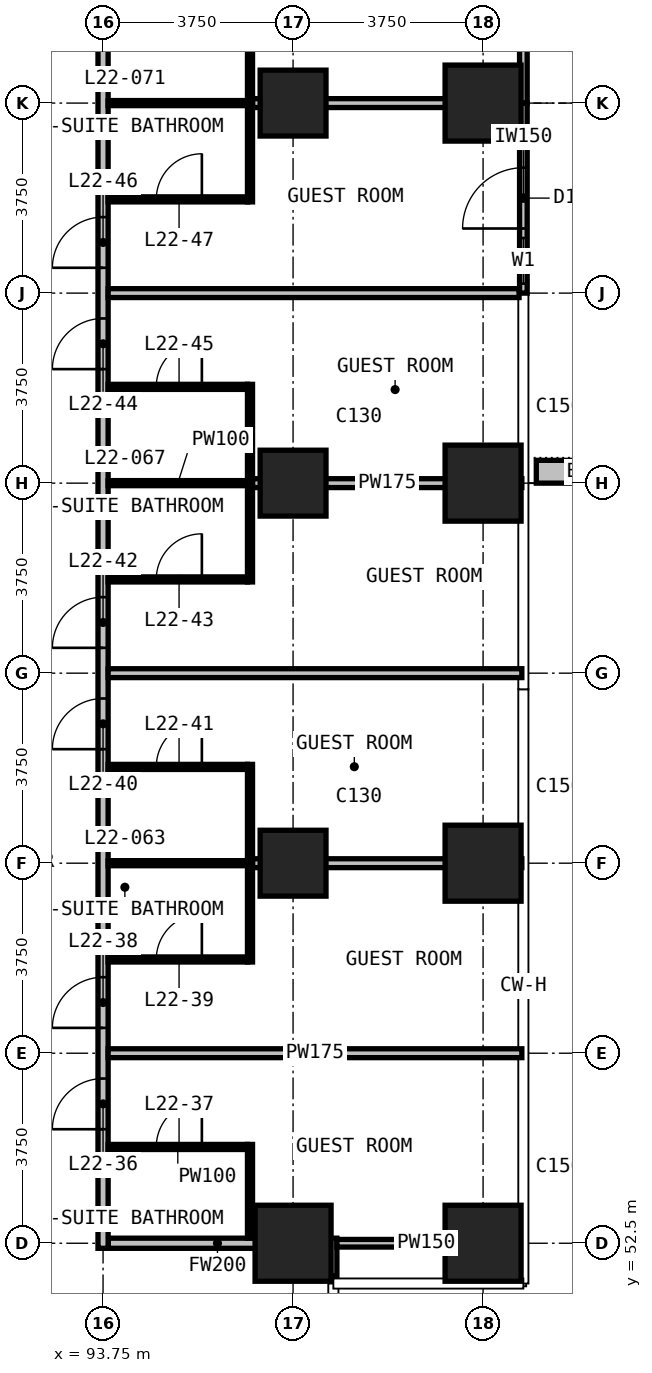
"""IFC4 building model, lengths in metres.
Left out: names, types, materials, properties, quantities, classifications, styles, units other than length and angle.
Written with IfcOpenShell. Run it as: python <this file> out.ifc"""

import sys

from ifc_helpers import new_model, si_unit, direction, frame, frame_2d, origin, origin_2d, place, context, subcontext, project, spatial, rectangle, extrude, element, fill, save


model = new_model("IFC4")
c1 = context("Model", 3, precision=1e-05, world=origin(), true_north=direction((0.0, 1.0)))
c2 = subcontext(c1, "Body", "Model", "MODEL_VIEW")
j1 = project(units=[si_unit("LENGTHUNIT", "METRE"), si_unit("PLANEANGLEUNIT", "RADIAN")], contexts=[c1])
p1 = place(None, origin())
s1 = spatial("IfcSite", under=j1, at=p1, CompositionType="ELEMENT")
p2 = place(p1, origin())
s2 = spatial("IfcBuilding", under=s1, at=p2, CompositionType="ELEMENT")
p3 = place(p2, frame((0.0, 0.0, 92.3)))
s3 = spatial("IfcBuildingStorey", under=s2, at=p3, CompositionType="ELEMENT", Elevation=92.3)
p4 = place(p3, frame((97.5, 52.5, 0.0), z_axis=(0.0, 0.0, 1.0), x_axis=(1.0, 0.0, 0.0)))
e1 = element("IfcColumn", 1, at=p4, inside=s3, PredefinedType="COLUMN", context=c2, shape_type="SweptSolid", body=[
    extrude(rectangle(XDim=1.5, YDim=1.5, at=origin_2d()), origin(), (0.0, 0.0, 1.0), 3.3),
])
for number, where, z_axis, x_axis in (
    (2, (97.5, 60.0, 0.0), (0.0, 0.0, 1.0), (1.0, 0.0, 0.0)),
    (3, (97.5, 67.5, 0.0), (0.0, 0.0, 1.0), (1.0, 0.0, 0.0)),
    (4, (97.5, 75.0, 0.0), (0.0, 0.0, 1.0), (1.0, 0.0, 0.0)),
):
    element("IfcColumn", number, at=place(p3, frame(where, z_axis=z_axis, x_axis=x_axis)), inside=s3, PredefinedType="COLUMN", context=c2, shape_type="SweptSolid", body=[
        extrude(rectangle(XDim=1.3, YDim=1.3, at=origin_2d()), origin(), (0.0, 0.0, 1.0), 3.3),
    ])
for number, where, z_axis, x_axis in (
    (5, (101.25, 52.5, 0.0), (0.0, 0.0, 1.0), (1.0, 0.0, 0.0)),
    (6, (101.25, 60.0, 0.0), (0.0, 0.0, 1.0), (1.0, 0.0, 0.0)),
    (7, (101.25, 67.5, 0.0), (0.0, 0.0, 1.0), (1.0, 0.0, 0.0)),
    (8, (101.25, 75.0, 0.0), (0.0, 0.0, 1.0), (1.0, 0.0, 0.0)),
):
    element("IfcColumn", number, at=place(p3, frame(where, z_axis=z_axis, x_axis=x_axis)), inside=s3, PredefinedType="COLUMN", context=c2, shape_type="SweptSolid", body=[
        extrude(rectangle(XDim=1.5, YDim=1.5, at=origin_2d()), origin(), (0.0, 0.0, 1.0), 3.3),
    ])
p5 = place(p3, frame((102.045, 71.25, 0.0), z_axis=(0.0, 0.0, 1.0), x_axis=(0.0, 1.0, 0.0)))
e9 = element("IfcWall", 9, at=p5, inside=s3, PredefinedType="SOLIDWALL", context=c2, shape_type="SweptSolid", body=[
    extrude(rectangle(XDim=3.75, YDim=0.15, at=frame_2d((1.875, 0.0))), origin(), (0.0, 0.0, 1.0), 3.0),
])
p6 = place(p5, frame((0.188, 0.0, 0.1)))
e10 = element("IfcOpeningElement", 10, at=p6, cuts=e9, PredefinedType="OPENING", context=c2, shape_type="SweptSolid", body=[
    extrude(rectangle(XDim=0.9, YDim=2.4, at=frame_2d((0.45, 1.2))), frame((0.0, 0.085, 0.0), z_axis=(0.0, -1.0, 0.0), x_axis=(1.0, 0.0, 0.0)), (0.0, 0.0, 1.0), 0.17),
])
p7 = place(p5, frame((1.275, 0.0, 0.0)))
e11 = element("IfcOpeningElement", 11, at=p7, cuts=e9, PredefinedType="OPENING", context=c2, shape_type="SweptSolid", body=[
    extrude(rectangle(XDim=1.2, YDim=2.4, at=frame_2d((0.6, 1.2))), frame((0.0, 0.085, 0.0), z_axis=(0.0, -1.0, 0.0), x_axis=(1.0, 0.0, 0.0)), (0.0, 0.0, 1.0), 0.17),
])
p8 = place(p3, frame((102.045, 75.0, 0.0), z_axis=(0.0, 0.0, 1.0), x_axis=(0.0, 1.0, 0.0)))
e12 = element("IfcWall", 12, at=p8, inside=s3, PredefinedType="SOLIDWALL", context=c2, shape_type="SweptSolid", body=[
    extrude(rectangle(XDim=3.75, YDim=0.15, at=frame_2d((1.875, 0.0))), origin(), (0.0, 0.0, 1.0), 3.0),
])
p9 = place(p8, frame((1.275, 0.0, 0.0)))
e13 = element("IfcOpeningElement", 13, at=p9, cuts=e12, PredefinedType="OPENING", context=c2, shape_type="SweptSolid", body=[
    extrude(rectangle(XDim=1.2, YDim=2.4, at=frame_2d((0.6, 1.2))), frame((0.0, 0.085, 0.0), z_axis=(0.0, -1.0, 0.0), x_axis=(1.0, 0.0, 0.0)), (0.0, 0.0, 1.0), 0.17),
])
p10 = place(p8, frame((2.663, 0.0, 0.1)))
e14 = element("IfcOpeningElement", 14, at=p10, cuts=e12, PredefinedType="OPENING", context=c2, shape_type="SweptSolid", body=[
    extrude(rectangle(XDim=0.9, YDim=2.4, at=frame_2d((0.45, 1.2))), frame((0.0, 0.085, 0.0), z_axis=(0.0, -1.0, 0.0), x_axis=(1.0, 0.0, 0.0)), (0.0, 0.0, 1.0), 0.17),
])
p11 = place(p3, frame((102.3, 67.725, 0.0), z_axis=(0.0, 0.0, 1.0), x_axis=(1.0, 0.0, 0.0)))
e15 = element("IfcWall", 15, at=p11, inside=s3, PredefinedType="USERDEFINED", context=c2, shape_type="SweptSolid", body=[
    extrude(rectangle(XDim=2.35, YDim=0.45, at=frame_2d((1.175, 0.0))), origin(), (0.0, 0.0, 1.0), 1.1),
])
p12 = place(p3, frame((93.85, 52.5, 0.0), z_axis=(0.0, 0.0, 1.0), x_axis=(1.0, 0.0, 0.0)))
e16 = element("IfcWall", 16, at=p12, inside=s3, PredefinedType="PARTITIONING", context=c2, shape_type="SweptSolid", body=[
    extrude(rectangle(XDim=4.315, YDim=0.2, at=frame_2d((2.157, 0.0))), origin(), (0.0, 0.0, 1.0), 3.0),
])
p13 = place(p3, frame((93.75, 52.4, 0.0), z_axis=(0.0, 0.0, 1.0), x_axis=(0.0, 1.0, 0.0)))
e17 = element("IfcWall", 17, at=p13, inside=s3, PredefinedType="PARTITIONING", context=c2, shape_type="SweptSolid", body=[
    extrude(rectangle(XDim=33.925, YDim=0.2, at=frame_2d((16.962, 0.0))), origin(), (0.0, 0.0, 1.0), 3.0),
])
p14 = place(p13, frame((2.35, 0.0, 0.0)))
e18 = element("IfcOpeningElement", 18, at=p14, cuts=e17, PredefinedType="OPENING", context=c2, shape_type="SweptSolid", body=[
    extrude(rectangle(XDim=1.0, YDim=2.2, at=frame_2d((0.5, 1.1))), frame((0.0, 0.11, 0.0), z_axis=(0.0, -1.0, 0.0), x_axis=(1.0, 0.0, 0.0)), (0.0, 0.0, 1.0), 0.22),
])
p15 = place(p13, frame((4.35, 0.0, 0.0)))
e19 = element("IfcOpeningElement", 19, at=p15, cuts=e17, PredefinedType="OPENING", context=c2, shape_type="SweptSolid", body=[
    extrude(rectangle(XDim=1.0, YDim=2.2, at=frame_2d((0.5, 1.1))), frame((0.0, 0.11, 0.0), z_axis=(0.0, -1.0, 0.0), x_axis=(1.0, 0.0, 0.0)), (0.0, 0.0, 1.0), 0.22),
])
p16 = place(p13, frame((9.85, 0.0, 0.0)))
e20 = element("IfcOpeningElement", 20, at=p16, cuts=e17, PredefinedType="OPENING", context=c2, shape_type="SweptSolid", body=[
    extrude(rectangle(XDim=1.0, YDim=2.2, at=frame_2d((0.5, 1.1))), frame((0.0, 0.11, 0.0), z_axis=(0.0, -1.0, 0.0), x_axis=(1.0, 0.0, 0.0)), (0.0, 0.0, 1.0), 0.22),
])
p17 = place(p13, frame((11.85, 0.0, 0.0)))
e21 = element("IfcOpeningElement", 21, at=p17, cuts=e17, PredefinedType="OPENING", context=c2, shape_type="SweptSolid", body=[
    extrude(rectangle(XDim=1.0, YDim=2.2, at=frame_2d((0.5, 1.1))), frame((0.0, 0.11, 0.0), z_axis=(0.0, -1.0, 0.0), x_axis=(1.0, 0.0, 0.0)), (0.0, 0.0, 1.0), 0.22),
])
p18 = place(p13, frame((17.35, 0.0, 0.0)))
e22 = element("IfcOpeningElement", 22, at=p18, cuts=e17, PredefinedType="OPENING", context=c2, shape_type="SweptSolid", body=[
    extrude(rectangle(XDim=1.0, YDim=2.2, at=frame_2d((0.5, 1.1))), frame((0.0, 0.11, 0.0), z_axis=(0.0, -1.0, 0.0), x_axis=(1.0, 0.0, 0.0)), (0.0, 0.0, 1.0), 0.22),
])
p19 = place(p13, frame((19.35, 0.0, 0.0)))
e23 = element("IfcOpeningElement", 23, at=p19, cuts=e17, PredefinedType="OPENING", context=c2, shape_type="SweptSolid", body=[
    extrude(rectangle(XDim=1.0, YDim=2.2, at=frame_2d((0.5, 1.1))), frame((0.0, 0.11, 0.0), z_axis=(0.0, -1.0, 0.0), x_axis=(1.0, 0.0, 0.0)), (0.0, 0.0, 1.0), 0.22),
])
p20 = place(p13, frame((24.85, 0.0, 0.0)))
e24 = element("IfcOpeningElement", 24, at=p20, cuts=e17, PredefinedType="OPENING", context=c2, shape_type="SweptSolid", body=[
    extrude(rectangle(XDim=1.0, YDim=2.2, at=frame_2d((0.5, 1.1))), frame((0.0, 0.11, 0.0), z_axis=(0.0, -1.0, 0.0), x_axis=(1.0, 0.0, 0.0)), (0.0, 0.0, 1.0), 0.22),
])
p21 = place(p13, frame((26.85, 0.0, 0.0)))
e25 = element("IfcOpeningElement", 25, at=p21, cuts=e17, PredefinedType="OPENING", context=c2, shape_type="SweptSolid", body=[
    extrude(rectangle(XDim=1.0, YDim=2.2, at=frame_2d((0.5, 1.1))), frame((0.0, 0.11, 0.0), z_axis=(0.0, -1.0, 0.0), x_axis=(1.0, 0.0, 0.0)), (0.0, 0.0, 1.0), 0.22),
])
p22 = place(p13, frame((31.55, 0.0, 0.0)))
e26 = element("IfcOpeningElement", 26, at=p22, cuts=e17, PredefinedType="OPENING", context=c2, shape_type="SweptSolid", body=[
    extrude(rectangle(XDim=0.9, YDim=2.2, at=frame_2d((0.45, 1.1))), frame((0.0, 0.11, 0.0), z_axis=(0.0, -1.0, 0.0), x_axis=(1.0, 0.0, 0.0)), (0.0, 0.0, 1.0), 0.22),
])
p23 = place(p3, frame((98.265, 51.855, 0.0), z_axis=(0.0, 0.0, 1.0), x_axis=(0.0, 1.0, 0.0)))
e27 = element("IfcWall", 27, at=p23, inside=s3, PredefinedType="PARTITIONING", context=c2, shape_type="SweptSolid", body=[
    extrude(rectangle(XDim=0.745, YDim=0.2, at=frame_2d((0.373, 0.0))), origin(), (0.0, 0.0, 1.0), 3.0),
])
p24 = place(p3, frame((93.85, 56.25, 0.0), z_axis=(0.0, 0.0, 1.0), x_axis=(1.0, 0.0, 0.0)))
e28 = element("IfcWall", 28, at=p24, inside=s3, PredefinedType="PARTITIONING", context=c2, shape_type="SweptSolid", body=[
    extrude(rectangle(XDim=8.165, YDim=0.175, at=frame_2d((4.083, 0.0))), origin(), (0.0, 0.0, 1.0), 3.0),
])
p25 = place(p3, frame((96.7, 60.0, 0.0), z_axis=(0.0, 0.0, 1.0), x_axis=(1.0, 0.0, 0.0)))
e29 = element("IfcWall", 29, at=p25, inside=s3, PredefinedType="PARTITIONING", context=c2, shape_type="SweptSolid", body=[
    extrude(rectangle(XDim=5.315, YDim=0.175, at=frame_2d((2.657, 0.0))), origin(), (0.0, 0.0, 1.0), 3.0),
])
p26 = place(p3, frame((93.85, 63.75, 0.0), z_axis=(0.0, 0.0, 1.0), x_axis=(1.0, 0.0, 0.0)))
e30 = element("IfcWall", 30, at=p26, inside=s3, PredefinedType="PARTITIONING", context=c2, shape_type="SweptSolid", body=[
    extrude(rectangle(XDim=8.165, YDim=0.175, at=frame_2d((4.083, 0.0))), origin(), (0.0, 0.0, 1.0), 3.0),
])
p27 = place(p3, frame((96.7, 67.5, 0.0), z_axis=(0.0, 0.0, 1.0), x_axis=(1.0, 0.0, 0.0)))
e31 = element("IfcWall", 31, at=p27, inside=s3, PredefinedType="PARTITIONING", context=c2, shape_type="SweptSolid", body=[
    extrude(rectangle(XDim=5.315, YDim=0.175, at=frame_2d((2.657, 0.0))), origin(), (0.0, 0.0, 1.0), 3.0),
])
p28 = place(p3, frame((93.85, 71.25, 0.0), z_axis=(0.0, 0.0, 1.0), x_axis=(1.0, 0.0, 0.0)))
e32 = element("IfcWall", 32, at=p28, inside=s3, PredefinedType="PARTITIONING", context=c2, shape_type="SweptSolid", body=[
    extrude(rectangle(XDim=8.11, YDim=0.175, at=frame_2d((4.055, 0.0))), origin(), (0.0, 0.0, 1.0), 3.0),
])
p29 = place(p3, frame((96.7, 75.0, 0.0), z_axis=(0.0, 0.0, 1.0), x_axis=(1.0, 0.0, 0.0)))
e33 = element("IfcWall", 33, at=p29, inside=s3, PredefinedType="PARTITIONING", context=c2, shape_type="SweptSolid", body=[
    extrude(rectangle(XDim=5.26, YDim=0.175, at=frame_2d((2.63, 0.0))), origin(), (0.0, 0.0, 1.0), 3.0),
])
p30 = place(p3, frame((98.365, 52.5, 0.0), z_axis=(0.0, 0.0, 1.0), x_axis=(1.0, 0.0, 0.0)))
e34 = element("IfcWall", 34, at=p30, inside=s3, PredefinedType="PARTITIONING", context=c2, shape_type="SweptSolid", body=[
    extrude(rectangle(XDim=3.53, YDim=0.15, at=frame_2d((1.765, 0.0))), origin(), (0.0, 0.0, 1.0), 3.0),
])
p31 = place(p3, frame((93.85, 54.4, 0.0), z_axis=(0.0, 0.0, 1.0), x_axis=(1.0, 0.0, 0.0)))
e35 = element("IfcWall", 35, at=p31, inside=s3, PredefinedType="PARTITIONING", context=c2, shape_type="SweptSolid", body=[
    extrude(rectangle(XDim=2.75, YDim=0.1, at=frame_2d((1.375, 0.0))), origin(), (0.0, 0.0, 1.0), 3.0),
])
p32 = place(p31, frame((0.95, 0.0, 0.0)))
e36 = element("IfcOpeningElement", 36, at=p32, cuts=e35, PredefinedType="OPENING", context=c2, shape_type="SweptSolid", body=[
    extrude(rectangle(XDim=0.9, YDim=2.2, at=frame_2d((0.45, 1.1))), frame((0.0, 0.06, 0.0), z_axis=(0.0, -1.0, 0.0), x_axis=(1.0, 0.0, 0.0)), (0.0, 0.0, 1.0), 0.12),
])
p33 = place(p3, frame((93.85, 58.1, 0.0), z_axis=(0.0, 0.0, 1.0), x_axis=(1.0, 0.0, 0.0)))
e37 = element("IfcWall", 37, at=p33, inside=s3, PredefinedType="PARTITIONING", context=c2, shape_type="SweptSolid", body=[
    extrude(rectangle(XDim=2.75, YDim=0.1, at=frame_2d((1.375, 0.0))), origin(), (0.0, 0.0, 1.0), 3.0),
])
p34 = place(p33, frame((0.95, 0.0, 0.0)))
e38 = element("IfcOpeningElement", 38, at=p34, cuts=e37, PredefinedType="OPENING", context=c2, shape_type="SweptSolid", body=[
    extrude(rectangle(XDim=0.9, YDim=2.2, at=frame_2d((0.45, 1.1))), frame((0.0, 0.06, 0.0), z_axis=(0.0, -1.0, 0.0), x_axis=(1.0, 0.0, 0.0)), (0.0, 0.0, 1.0), 0.12),
])
p35 = place(p3, frame((93.85, 60.0, 0.0), z_axis=(0.0, 0.0, 1.0), x_axis=(1.0, 0.0, 0.0)))
e39 = element("IfcWall", 39, at=p35, inside=s3, PredefinedType="PARTITIONING", context=c2, shape_type="SweptSolid", body=[
    extrude(rectangle(XDim=2.75, YDim=0.1, at=frame_2d((1.375, 0.0))), origin(), (0.0, 0.0, 1.0), 3.0),
])
p36 = place(p3, frame((93.85, 61.9, 0.0), z_axis=(0.0, 0.0, 1.0), x_axis=(1.0, 0.0, 0.0)))
e40 = element("IfcWall", 40, at=p36, inside=s3, PredefinedType="PARTITIONING", context=c2, shape_type="SweptSolid", body=[
    extrude(rectangle(XDim=2.75, YDim=0.1, at=frame_2d((1.375, 0.0))), origin(), (0.0, 0.0, 1.0), 3.0),
])
p37 = place(p36, frame((0.95, 0.0, 0.0)))
e41 = element("IfcOpeningElement", 41, at=p37, cuts=e40, PredefinedType="OPENING", context=c2, shape_type="SweptSolid", body=[
    extrude(rectangle(XDim=0.9, YDim=2.2, at=frame_2d((0.45, 1.1))), frame((0.0, 0.06, 0.0), z_axis=(0.0, -1.0, 0.0), x_axis=(1.0, 0.0, 0.0)), (0.0, 0.0, 1.0), 0.12),
])
p38 = place(p3, frame((93.85, 65.6, 0.0), z_axis=(0.0, 0.0, 1.0), x_axis=(1.0, 0.0, 0.0)))
e42 = element("IfcWall", 42, at=p38, inside=s3, PredefinedType="PARTITIONING", context=c2, shape_type="SweptSolid", body=[
    extrude(rectangle(XDim=2.75, YDim=0.1, at=frame_2d((1.375, 0.0))), origin(), (0.0, 0.0, 1.0), 3.0),
])
p39 = place(p38, frame((0.95, 0.0, 0.0)))
e43 = element("IfcOpeningElement", 43, at=p39, cuts=e42, PredefinedType="OPENING", context=c2, shape_type="SweptSolid", body=[
    extrude(rectangle(XDim=0.9, YDim=2.2, at=frame_2d((0.45, 1.1))), frame((0.0, 0.06, 0.0), z_axis=(0.0, -1.0, 0.0), x_axis=(1.0, 0.0, 0.0)), (0.0, 0.0, 1.0), 0.12),
])
p40 = place(p3, frame((93.85, 67.5, 0.0), z_axis=(0.0, 0.0, 1.0), x_axis=(1.0, 0.0, 0.0)))
e44 = element("IfcWall", 44, at=p40, inside=s3, PredefinedType="PARTITIONING", context=c2, shape_type="SweptSolid", body=[
    extrude(rectangle(XDim=2.75, YDim=0.1, at=frame_2d((1.375, 0.0))), origin(), (0.0, 0.0, 1.0), 3.0),
])
p41 = place(p3, frame((93.85, 69.4, 0.0), z_axis=(0.0, 0.0, 1.0), x_axis=(1.0, 0.0, 0.0)))
e45 = element("IfcWall", 45, at=p41, inside=s3, PredefinedType="PARTITIONING", context=c2, shape_type="SweptSolid", body=[
    extrude(rectangle(XDim=2.75, YDim=0.1, at=frame_2d((1.375, 0.0))), origin(), (0.0, 0.0, 1.0), 3.0),
])
p42 = place(p41, frame((0.95, 0.0, 0.0)))
e46 = element("IfcOpeningElement", 46, at=p42, cuts=e45, PredefinedType="OPENING", context=c2, shape_type="SweptSolid", body=[
    extrude(rectangle(XDim=0.9, YDim=2.2, at=frame_2d((0.45, 1.1))), frame((0.0, 0.06, 0.0), z_axis=(0.0, -1.0, 0.0), x_axis=(1.0, 0.0, 0.0)), (0.0, 0.0, 1.0), 0.12),
])
p43 = place(p3, frame((93.85, 73.1, 0.0), z_axis=(0.0, 0.0, 1.0), x_axis=(1.0, 0.0, 0.0)))
e47 = element("IfcWall", 47, at=p43, inside=s3, PredefinedType="PARTITIONING", context=c2, shape_type="SweptSolid", body=[
    extrude(rectangle(XDim=2.75, YDim=0.1, at=frame_2d((1.375, 0.0))), origin(), (0.0, 0.0, 1.0), 3.0),
])
p44 = place(p43, frame((0.95, 0.0, 0.0)))
e48 = element("IfcOpeningElement", 48, at=p44, cuts=e47, PredefinedType="OPENING", context=c2, shape_type="SweptSolid", body=[
    extrude(rectangle(XDim=0.9, YDim=2.2, at=frame_2d((0.45, 1.1))), frame((0.0, 0.06, 0.0), z_axis=(0.0, -1.0, 0.0), x_axis=(1.0, 0.0, 0.0)), (0.0, 0.0, 1.0), 0.12),
])
p45 = place(p3, frame((93.85, 75.0, 0.0), z_axis=(0.0, 0.0, 1.0), x_axis=(1.0, 0.0, 0.0)))
e49 = element("IfcWall", 49, at=p45, inside=s3, PredefinedType="PARTITIONING", context=c2, shape_type="SweptSolid", body=[
    extrude(rectangle(XDim=2.75, YDim=0.1, at=frame_2d((1.375, 0.0))), origin(), (0.0, 0.0, 1.0), 3.0),
])
p46 = place(p3, frame((96.65, 52.6, 0.0), z_axis=(0.0, 0.0, 1.0), x_axis=(0.0, 1.0, 0.0)))
e50 = element("IfcWall", 50, at=p46, inside=s3, PredefinedType="PARTITIONING", context=c2, shape_type="SweptSolid", body=[
    extrude(rectangle(XDim=1.85, YDim=0.1, at=frame_2d((0.925, 0.0))), origin(), (0.0, 0.0, 1.0), 3.0),
])
for number, where, z_axis, x_axis in (
    (51, (96.65, 58.05, 0.0), (0.0, 0.0, 1.0), (0.0, 1.0, 0.0)),
    (52, (96.65, 65.55, 0.0), (0.0, 0.0, 1.0), (0.0, 1.0, 0.0)),
    (53, (96.65, 73.05, 0.0), (0.0, 0.0, 1.0), (0.0, 1.0, 0.0)),
):
    element("IfcWall", number, at=place(p3, frame(where, z_axis=z_axis, x_axis=x_axis)), inside=s3, PredefinedType="PARTITIONING", context=c2, shape_type="SweptSolid", body=[
        extrude(rectangle(XDim=3.9, YDim=0.1, at=frame_2d((1.95, 0.0))), origin(), (0.0, 0.0, 1.0), 3.0),
    ])
p47 = place(p6, origin())
e54 = element("IfcWindow", 54, at=p47, inside=s3, PartitioningType="SINGLE_PANEL", PredefinedType="WINDOW", context=c2, shape_type="SweptSolid", body=[
    extrude(rectangle(XDim=0.9, YDim=2.4, at=frame_2d((0.45, 1.2))), frame((0.0, 0.03, 0.0), z_axis=(0.0, -1.0, 0.0), x_axis=(1.0, 0.0, 0.0)), (0.0, 0.0, 1.0), 0.06),
])
fill(e10, e54)
p48 = place(p7, origin())
e55 = element("IfcDoor", 55, at=p48, inside=s3, OperationType="SINGLE_SWING_LEFT", PredefinedType="DOOR", context=c2, shape_type="SweptSolid", body=[
    extrude(rectangle(XDim=1.2, YDim=2.4, at=frame_2d((0.6, 1.2))), frame((0.0, 0.025, 0.0), z_axis=(0.0, -1.0, 0.0), x_axis=(1.0, 0.0, 0.0)), (0.0, 0.0, 1.0), 0.05),
])
fill(e11, e55)
p49 = place(p14, origin())
e56 = element("IfcDoor", 56, at=p49, inside=s3, OperationType="SINGLE_SWING_LEFT", PredefinedType="DOOR", context=c2, shape_type="SweptSolid", body=[
    extrude(rectangle(XDim=1.0, YDim=2.2, at=frame_2d((0.5, 1.1))), frame((0.0, 0.025, 0.0), z_axis=(0.0, -1.0, 0.0), x_axis=(1.0, 0.0, 0.0)), (0.0, 0.0, 1.0), 0.05),
])
fill(e18, e56)
p50 = place(p32, origin())
e57 = element("IfcDoor", 57, at=p50, inside=s3, OperationType="SINGLE_SWING_RIGHT", PredefinedType="DOOR", context=c2, shape_type="SweptSolid", body=[
    extrude(rectangle(XDim=0.9, YDim=2.2, at=frame_2d((0.45, 1.1))), frame((0.0, 0.025, 0.0), z_axis=(0.0, -1.0, 0.0), x_axis=(1.0, 0.0, 0.0)), (0.0, 0.0, 1.0), 0.05),
])
fill(e36, e57)
p51 = place(p15, origin())
e58 = element("IfcDoor", 58, at=p51, inside=s3, OperationType="SINGLE_SWING_LEFT", PredefinedType="DOOR", context=c2, shape_type="SweptSolid", body=[
    extrude(rectangle(XDim=1.0, YDim=2.2, at=frame_2d((0.5, 1.1))), frame((0.0, 0.025, 0.0), z_axis=(0.0, -1.0, 0.0), x_axis=(1.0, 0.0, 0.0)), (0.0, 0.0, 1.0), 0.05),
])
fill(e19, e58)
p52 = place(p34, origin())
e59 = element("IfcDoor", 59, at=p52, inside=s3, OperationType="SINGLE_SWING_RIGHT", PredefinedType="DOOR", context=c2, shape_type="SweptSolid", body=[
    extrude(rectangle(XDim=0.9, YDim=2.2, at=frame_2d((0.45, 1.1))), frame((0.0, 0.025, 0.0), z_axis=(0.0, -1.0, 0.0), x_axis=(1.0, 0.0, 0.0)), (0.0, 0.0, 1.0), 0.05),
])
fill(e38, e59)
p53 = place(p16, origin())
e60 = element("IfcDoor", 60, at=p53, inside=s3, OperationType="SINGLE_SWING_RIGHT", PredefinedType="DOOR", context=c2, shape_type="SweptSolid", body=[
    extrude(rectangle(XDim=1.0, YDim=2.2, at=frame_2d((0.5, 1.1))), frame((0.0, 0.025, 0.0), z_axis=(0.0, -1.0, 0.0), x_axis=(1.0, 0.0, 0.0)), (0.0, 0.0, 1.0), 0.05),
])
fill(e20, e60)
p54 = place(p37, origin())
e61 = element("IfcDoor", 61, at=p54, inside=s3, OperationType="SINGLE_SWING_RIGHT", PredefinedType="DOOR", context=c2, shape_type="SweptSolid", body=[
    extrude(rectangle(XDim=0.9, YDim=2.2, at=frame_2d((0.45, 1.1))), frame((0.0, 0.025, 0.0), z_axis=(0.0, -1.0, 0.0), x_axis=(1.0, 0.0, 0.0)), (0.0, 0.0, 1.0), 0.05),
])
fill(e41, e61)
p55 = place(p17, origin())
e62 = element("IfcDoor", 62, at=p55, inside=s3, OperationType="SINGLE_SWING_RIGHT", PredefinedType="DOOR", context=c2, shape_type="SweptSolid", body=[
    extrude(rectangle(XDim=1.0, YDim=2.2, at=frame_2d((0.5, 1.1))), frame((0.0, 0.025, 0.0), z_axis=(0.0, -1.0, 0.0), x_axis=(1.0, 0.0, 0.0)), (0.0, 0.0, 1.0), 0.05),
])
fill(e21, e62)
p56 = place(p39, origin())
e63 = element("IfcDoor", 63, at=p56, inside=s3, OperationType="SINGLE_SWING_RIGHT", PredefinedType="DOOR", context=c2, shape_type="SweptSolid", body=[
    extrude(rectangle(XDim=0.9, YDim=2.2, at=frame_2d((0.45, 1.1))), frame((0.0, 0.025, 0.0), z_axis=(0.0, -1.0, 0.0), x_axis=(1.0, 0.0, 0.0)), (0.0, 0.0, 1.0), 0.05),
])
fill(e43, e63)
p57 = place(p18, origin())
e64 = element("IfcDoor", 64, at=p57, inside=s3, OperationType="SINGLE_SWING_LEFT", PredefinedType="DOOR", context=c2, shape_type="SweptSolid", body=[
    extrude(rectangle(XDim=1.0, YDim=2.2, at=frame_2d((0.5, 1.1))), frame((0.0, 0.025, 0.0), z_axis=(0.0, -1.0, 0.0), x_axis=(1.0, 0.0, 0.0)), (0.0, 0.0, 1.0), 0.05),
])
fill(e22, e64)
p58 = place(p42, origin())
e65 = element("IfcDoor", 65, at=p58, inside=s3, OperationType="SINGLE_SWING_RIGHT", PredefinedType="DOOR", context=c2, shape_type="SweptSolid", body=[
    extrude(rectangle(XDim=0.9, YDim=2.2, at=frame_2d((0.45, 1.1))), frame((0.0, 0.025, 0.0), z_axis=(0.0, -1.0, 0.0), x_axis=(1.0, 0.0, 0.0)), (0.0, 0.0, 1.0), 0.05),
])
fill(e46, e65)
p59 = place(p19, origin())
e66 = element("IfcDoor", 66, at=p59, inside=s3, OperationType="SINGLE_SWING_LEFT", PredefinedType="DOOR", context=c2, shape_type="SweptSolid", body=[
    extrude(rectangle(XDim=1.0, YDim=2.2, at=frame_2d((0.5, 1.1))), frame((0.0, 0.025, 0.0), z_axis=(0.0, -1.0, 0.0), x_axis=(1.0, 0.0, 0.0)), (0.0, 0.0, 1.0), 0.05),
])
fill(e23, e66)
p60 = place(p44, origin())
e67 = element("IfcDoor", 67, at=p60, inside=s3, OperationType="SINGLE_SWING_RIGHT", PredefinedType="DOOR", context=c2, shape_type="SweptSolid", body=[
    extrude(rectangle(XDim=0.9, YDim=2.2, at=frame_2d((0.45, 1.1))), frame((0.0, 0.025, 0.0), z_axis=(0.0, -1.0, 0.0), x_axis=(1.0, 0.0, 0.0)), (0.0, 0.0, 1.0), 0.05),
])
fill(e48, e67)
save(model, sys.argv[1])
